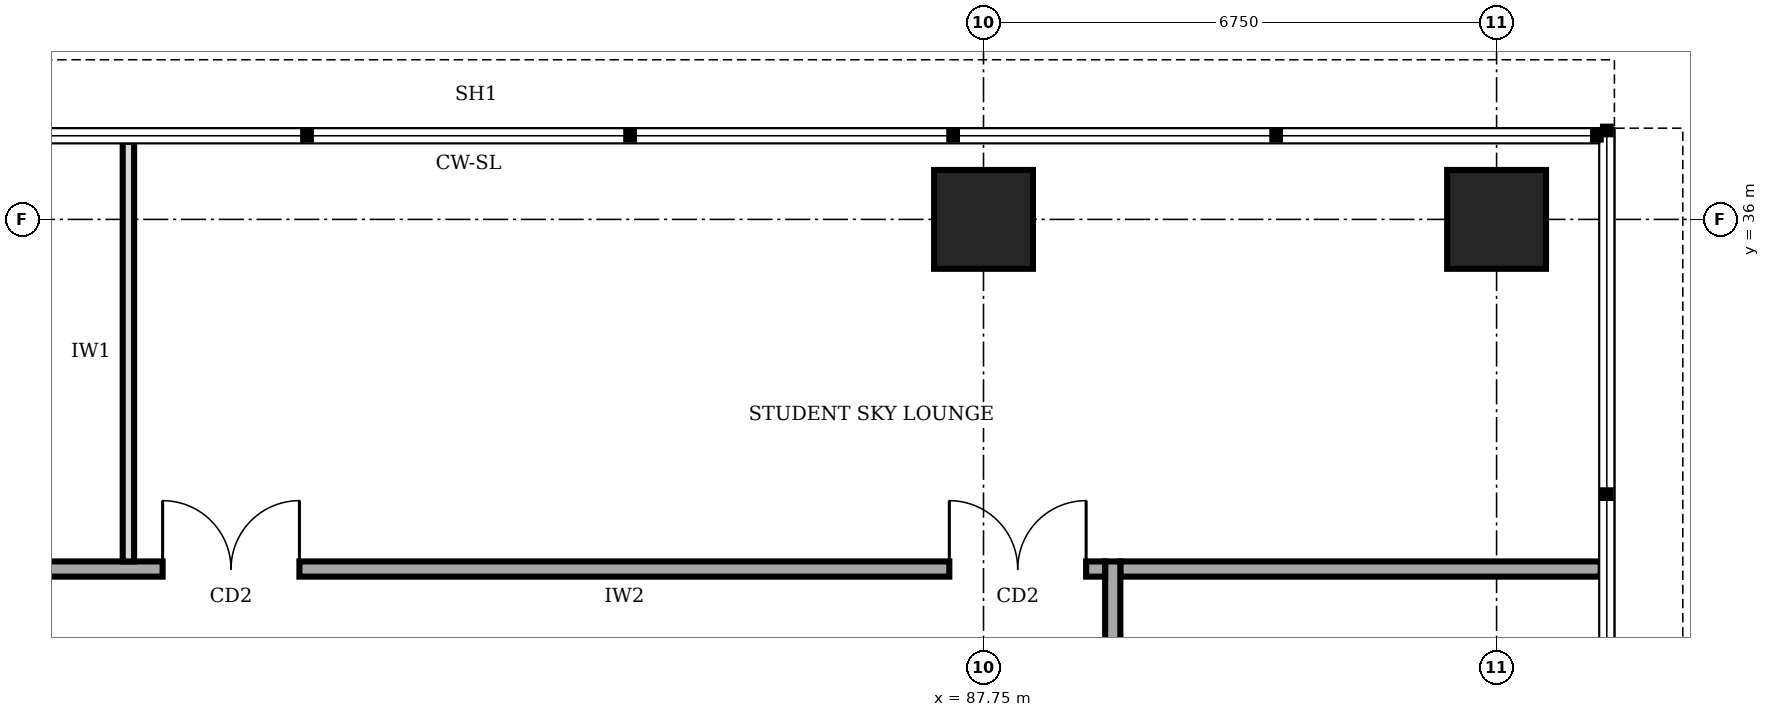
"""IFC4 building model, lengths in metres.
Left out: names, types, materials, properties, quantities, classifications, styles, units other than length and angle.
Written with IfcOpenShell. Run it as: python <this file> out.ifc"""

import sys

from ifc_helpers import new_model, si_unit, direction, frame, frame_2d, origin, origin_2d, place, context, subcontext, project, spatial, rectangle, extrude, element, fill, save


model = new_model("IFC4")
c1 = context("Model", 3, precision=1e-05, world=origin(), true_north=direction((0.0, 1.0)))
c2 = subcontext(c1, "Body", "Model", "MODEL_VIEW")
j1 = project(units=[si_unit("LENGTHUNIT", "METRE"), si_unit("PLANEANGLEUNIT", "RADIAN")], contexts=[c1])
p1 = place(None, origin())
s1 = spatial("IfcSite", under=j1, at=p1, CompositionType="ELEMENT")
p2 = place(p1, origin())
s2 = spatial("IfcBuilding", under=s1, at=p2, CompositionType="ELEMENT")
p3 = place(p2, frame((0.0, 0.0, 233.0)))
s3 = spatial("IfcBuildingStorey", under=s2, at=p3, CompositionType="ELEMENT", Elevation=233.0)
for number, where, z_axis, x_axis in (
    (1, (87.75, 36.0, 0.0), (0.0, 0.0, 1.0), (1.0, 0.0, 0.0)),
    (2, (94.5, 36.0, 0.0), (0.0, 0.0, 1.0), (1.0, 0.0, 0.0)),
):
    element("IfcColumn", number, at=place(p3, frame(where, z_axis=z_axis, x_axis=x_axis)), inside=s3, PredefinedType="COLUMN", context=c2, shape_type="SweptSolid", body=[
        extrude(rectangle(XDim=1.3, YDim=1.3, at=origin_2d()), origin(), (0.0, 0.0, 1.0), 4.0),
    ])
p4 = place(p3, frame((89.45, 9.2, 0.0), z_axis=(0.0, 0.0, 1.0), x_axis=(0.0, 1.0, 0.0)))
e3 = element("IfcWall", 3, at=p4, inside=s3, PredefinedType="SOLIDWALL", context=c2, shape_type="SweptSolid", body=[
    extrude(rectangle(XDim=22.3, YDim=0.2, at=frame_2d((11.15, 0.0))), origin(), (0.0, 0.0, 1.0), 3.75),
])
p5 = place(p4, frame((1.55, 0.0, 0.0)))
e4 = element("IfcOpeningElement", 4, at=p5, cuts=e3, PredefinedType="OPENING", context=c2, shape_type="SweptSolid", body=[
    extrude(rectangle(XDim=1.0, YDim=2.1, at=frame_2d((0.5, 1.05))), frame((0.0, 0.11, 0.0), z_axis=(0.0, -1.0, 0.0), x_axis=(1.0, 0.0, 0.0)), (0.0, 0.0, 1.0), 0.22),
])
p6 = place(p4, frame((5.75, 0.0, 0.0)))
e5 = element("IfcOpeningElement", 5, at=p6, cuts=e3, PredefinedType="OPENING", context=c2, shape_type="SweptSolid", body=[
    extrude(rectangle(XDim=0.9, YDim=2.1, at=frame_2d((0.45, 1.05))), frame((0.0, 0.11, 0.0), z_axis=(0.0, -1.0, 0.0), x_axis=(1.0, 0.0, 0.0)), (0.0, 0.0, 1.0), 0.22),
])
p7 = place(p4, frame((8.75, 0.0, 0.0)))
e6 = element("IfcOpeningElement", 6, at=p7, cuts=e3, PredefinedType="OPENING", context=c2, shape_type="SweptSolid", body=[
    extrude(rectangle(XDim=0.9, YDim=2.1, at=frame_2d((0.45, 1.05))), frame((0.0, 0.11, 0.0), z_axis=(0.0, -1.0, 0.0), x_axis=(1.0, 0.0, 0.0)), (0.0, 0.0, 1.0), 0.22),
])
p8 = place(p4, frame((13.6, 0.0, 0.0)))
e7 = element("IfcOpeningElement", 7, at=p8, cuts=e3, PredefinedType="OPENING", context=c2, shape_type="SweptSolid", body=[
    extrude(rectangle(XDim=0.9, YDim=2.1, at=frame_2d((0.45, 1.05))), frame((0.0, 0.11, 0.0), z_axis=(0.0, -1.0, 0.0), x_axis=(1.0, 0.0, 0.0)), (0.0, 0.0, 1.0), 0.22),
])
p9 = place(p4, frame((16.3, 0.0, 0.0)))
e8 = element("IfcOpeningElement", 8, at=p9, cuts=e3, PredefinedType="OPENING", context=c2, shape_type="SweptSolid", body=[
    extrude(rectangle(XDim=1.0, YDim=2.1, at=frame_2d((0.5, 1.05))), frame((0.0, 0.11, 0.0), z_axis=(0.0, -1.0, 0.0), x_axis=(1.0, 0.0, 0.0)), (0.0, 0.0, 1.0), 0.22),
])
p10 = place(p4, frame((10.8, 0.0, 0.0)))
e9 = element("IfcOpeningElement", 9, at=p10, cuts=e3, PredefinedType="OPENING", context=c2, shape_type="SweptSolid", body=[
    extrude(rectangle(XDim=1.0, YDim=2.1, at=frame_2d((0.5, 1.05))), frame((0.0, 0.11, 0.0), z_axis=(0.0, -1.0, 0.0), x_axis=(1.0, 0.0, 0.0)), (0.0, 0.0, 1.0), 0.22),
])
p11 = place(p4, frame((19.55, 0.0, 0.0)))
e10 = element("IfcOpeningElement", 10, at=p11, cuts=e3, PredefinedType="OPENING", context=c2, shape_type="SweptSolid", body=[
    extrude(rectangle(XDim=1.0, YDim=2.1, at=frame_2d((0.5, 1.05))), frame((0.0, 0.11, 0.0), z_axis=(0.0, -1.0, 0.0), x_axis=(1.0, 0.0, 0.0)), (0.0, 0.0, 1.0), 0.22),
])
p12 = place(p3, frame((89.35, 31.4, 0.0), z_axis=(0.0, 0.0, 1.0), x_axis=(-1.0, 0.0, 0.0)))
e11 = element("IfcWall", 11, at=p12, inside=s3, PredefinedType="SOLIDWALL", context=c2, shape_type="SweptSolid", body=[
    extrude(rectangle(XDim=16.9, YDim=0.2, at=frame_2d((8.45, 0.0))), origin(), (0.0, 0.0, 1.0), 3.75),
])
p13 = place(p12, frame((14.375, 0.0, 0.0)))
e12 = element("IfcOpeningElement", 12, at=p13, cuts=e11, PredefinedType="OPENING", context=c2, shape_type="SweptSolid", body=[
    extrude(rectangle(XDim=1.0, YDim=2.1, at=frame_2d((0.5, 1.05))), frame((0.0, 0.11, 0.0), z_axis=(0.0, -1.0, 0.0), x_axis=(1.0, 0.0, 0.0)), (0.0, 0.0, 1.0), 0.22),
])
p14 = place(p12, frame((10.6, 0.0, 0.0)))
e13 = element("IfcOpeningElement", 13, at=p14, cuts=e11, PredefinedType="OPENING", context=c2, shape_type="SweptSolid", body=[
    extrude(rectangle(XDim=1.8, YDim=2.1, at=frame_2d((0.9, 1.05))), frame((0.0, 0.11, 0.0), z_axis=(0.0, -1.0, 0.0), x_axis=(1.0, 0.0, 0.0)), (0.0, 0.0, 1.0), 0.22),
])
p15 = place(p12, frame((0.25, 0.0, 0.0)))
e14 = element("IfcOpeningElement", 14, at=p15, cuts=e11, PredefinedType="OPENING", context=c2, shape_type="SweptSolid", body=[
    extrude(rectangle(XDim=1.8, YDim=2.1, at=frame_2d((0.9, 1.05))), frame((0.0, 0.11, 0.0), z_axis=(0.0, -1.0, 0.0), x_axis=(1.0, 0.0, 0.0)), (0.0, 0.0, 1.0), 0.22),
])
p16 = place(p3, frame((89.55, 31.4, 0.0), z_axis=(0.0, 0.0, 1.0), x_axis=(1.0, 0.0, 0.0)))
e15 = element("IfcWall", 15, at=p16, inside=s3, PredefinedType="SOLIDWALL", context=c2, shape_type="SweptSolid", body=[
    extrude(rectangle(XDim=6.32, YDim=0.2, at=frame_2d((3.16, 0.0))), origin(), (0.0, 0.0, 1.0), 3.75),
])
p17 = place(p3, frame((76.5, 31.5, 0.0), z_axis=(0.0, 0.0, 1.0), x_axis=(0.0, 1.0, 0.0)))
e16 = element("IfcWall", 16, at=p17, inside=s3, PredefinedType="PARTITIONING", context=c2, shape_type="SweptSolid", body=[
    extrude(rectangle(XDim=5.52, YDim=0.15, at=frame_2d((2.76, 0.0))), origin(), (0.0, 0.0, 1.0), 3.75),
])
p18 = place(p14, frame((1.8, 0.0, 0.0), z_axis=(0.0, 0.0, 1.0), x_axis=(-1.0, 0.0, 0.0)))
e17 = element("IfcDoor", 17, at=p18, inside=s3, OperationType="DOUBLE_DOOR_SINGLE_SWING", PredefinedType="DOOR", context=c2, shape_type="SweptSolid", body=[
    extrude(rectangle(XDim=1.8, YDim=2.1, at=frame_2d((0.9, 1.05))), frame((0.0, 0.025, 0.0), z_axis=(0.0, -1.0, 0.0), x_axis=(1.0, 0.0, 0.0)), (0.0, 0.0, 1.0), 0.05),
])
fill(e13, e17)
p19 = place(p15, frame((1.8, 0.0, 0.0), z_axis=(0.0, 0.0, 1.0), x_axis=(-1.0, 0.0, 0.0)))
e18 = element("IfcDoor", 18, at=p19, inside=s3, OperationType="DOUBLE_DOOR_SINGLE_SWING", PredefinedType="DOOR", context=c2, shape_type="SweptSolid", body=[
    extrude(rectangle(XDim=1.8, YDim=2.1, at=frame_2d((0.9, 1.05))), frame((0.0, 0.025, 0.0), z_axis=(0.0, -1.0, 0.0), x_axis=(1.0, 0.0, 0.0)), (0.0, 0.0, 1.0), 0.05),
])
fill(e14, e18)
save(model, sys.argv[1])
